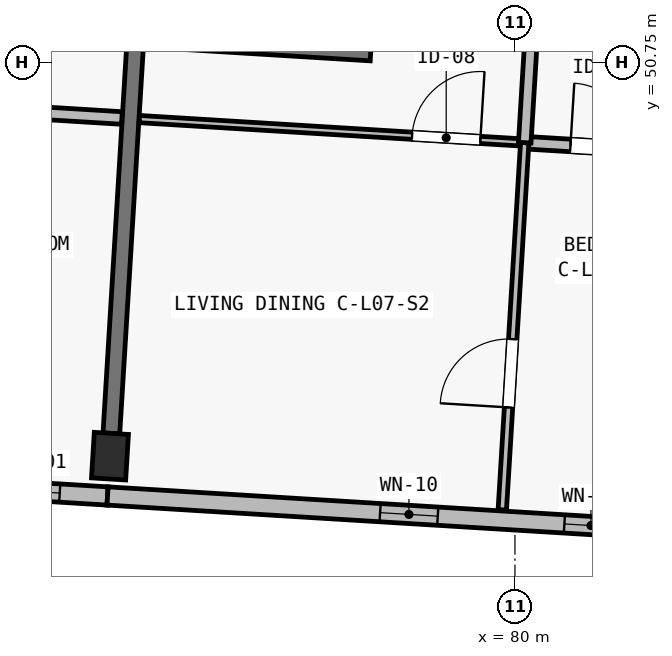
"""IFC4 building model, lengths in metres.
Left out: names, types, materials, properties, quantities, classifications, styles, units other than length and angle.
Written with IfcOpenShell. Run it as: python <this file> out.ifc"""

import sys

from ifc_helpers import new_model, si_unit, direction, frame, frame_2d, origin, origin_2d, place, context, subcontext, project, spatial, rectangle, extrude, element, fill, save


model = new_model("IFC4")
c1 = context("Model", 3, precision=1e-05, world=origin(), true_north=direction((0.0, 1.0)))
c2 = subcontext(c1, "Body", "Model", "MODEL_VIEW")
j1 = project(units=[si_unit("LENGTHUNIT", "METRE"), si_unit("PLANEANGLEUNIT", "RADIAN")], contexts=[c1])
p1 = place(None, origin())
s1 = spatial("IfcSite", under=j1, at=p1, CompositionType="ELEMENT")
p2 = place(p1, origin())
s2 = spatial("IfcBuilding", under=s1, at=p2, CompositionType="ELEMENT")
p3 = place(p2, frame((0.0, 0.0, 24.65)))
s3 = spatial("IfcBuildingStorey", under=s2, at=p3, CompositionType="ELEMENT", Elevation=24.65)
p4 = place(p3, frame((74.672, 45.572, 0.0), z_axis=(0.0, 0.0, 1.0), x_axis=(0.998134798422, -0.061048539535, 0.0)))
e1 = element("IfcColumn", 1, at=p4, inside=s3, PredefinedType="COLUMN", context=c2, shape_type="SweptSolid", body=[
    extrude(rectangle(XDim=0.45, YDim=0.6, at=origin_2d()), origin(), (0.0, 0.0, 1.0), 3.25),
])
p5 = place(p3, frame((74.69, 45.872, 0.0), z_axis=(0.0, 0.0, 1.0), x_axis=(0.061036313012, 0.998135546153, 0.0)))
e2 = element("IfcWall", 2, at=p5, inside=s3, PredefinedType="SHEAR", context=c2, shape_type="SweptSolid", body=[
    extrude(rectangle(XDim=7.0, YDim=0.22, at=frame_2d((3.5, 0.0))), origin(), (0.0, 0.0, 1.0), 2.5),
])
p6 = place(p3, frame((75.119, 51.08, 0.0), z_axis=(0.0, 0.0, 1.0), x_axis=(0.998133370443, -0.061071882298, 0.0)))
e3 = element("IfcWall", 3, at=p6, inside=s3, PredefinedType="SHEAR", context=c2, shape_type="SweptSolid", body=[
    extrude(rectangle(XDim=2.99, YDim=0.25, at=frame_2d((1.495, 0.0))), origin(), (0.0, 0.0, 1.0), 3.25),
])
p7 = place(p3, frame((74.64, 45.048, 0.0), z_axis=(0.0, 0.0, 1.0), x_axis=(-0.998135669243, 0.061034300063, 0.0)))
e4 = element("IfcWall", 4, at=p7, inside=s3, PredefinedType="SOLIDWALL", context=c2, shape_type="SweptSolid", body=[
    extrude(rectangle(XDim=7.6, YDim=0.24, at=frame_2d((3.8, 0.0))), origin(), (0.0, 0.0, 1.0), 3.0),
])
p8 = place(p7, frame((5.169, 0.0, 0.0)))
e5 = element("IfcOpeningElement", 5, at=p8, cuts=e4, PredefinedType="OPENING", context=c2, shape_type="SweptSolid", body=[
    extrude(rectangle(XDim=1.5, YDim=2.12, at=frame_2d((0.75, 1.06))), frame((0.0, 0.135, 0.0), z_axis=(0.0, -1.0, 0.0), x_axis=(1.0, 0.0, 0.0)), (0.0, 0.0, 1.0), 0.27),
])
p9 = place(p7, frame((0.63, 0.0, 0.5)))
e6 = element("IfcOpeningElement", 6, at=p9, cuts=e4, PredefinedType="OPENING", context=c2, shape_type="SweptSolid", body=[
    extrude(rectangle(XDim=0.58, YDim=2.16, at=frame_2d((0.29, 1.08))), frame((0.0, 0.135, 0.0), z_axis=(0.0, -1.0, 0.0), x_axis=(1.0, 0.0, 0.0)), (0.0, 0.0, 1.0), 0.27),
])
p10 = place(p3, frame((82.225, 44.584, 0.0), z_axis=(0.0, 0.0, 1.0), x_axis=(-0.998133591969, 0.061068261669, 0.0)))
e7 = element("IfcWall", 7, at=p10, inside=s3, PredefinedType="SOLIDWALL", context=c2, shape_type="SweptSolid", body=[
    extrude(rectangle(XDim=7.6, YDim=0.24, at=frame_2d((3.8, 0.0))), origin(), (0.0, 0.0, 1.0), 3.0),
])
p11 = place(p10, frame((0.878, 0.0, 0.42)))
e8 = element("IfcOpeningElement", 8, at=p11, cuts=e7, PredefinedType="OPENING", context=c2, shape_type="SweptSolid", body=[
    extrude(rectangle(XDim=0.7, YDim=2.36, at=frame_2d((0.35, 1.18))), frame((0.0, 0.135, 0.0), z_axis=(0.0, -1.0, 0.0), x_axis=(1.0, 0.0, 0.0)), (0.0, 0.0, 1.0), 0.27),
])
p12 = place(p10, frame((3.247, 0.0, 0.42)))
e9 = element("IfcOpeningElement", 9, at=p12, cuts=e7, PredefinedType="OPENING", context=c2, shape_type="SweptSolid", body=[
    extrude(rectangle(XDim=0.76, YDim=2.34, at=frame_2d((0.38, 1.17))), frame((0.0, 0.135, 0.0), z_axis=(0.0, -1.0, 0.0), x_axis=(1.0, 0.0, 0.0)), (0.0, 0.0, 1.0), 0.27),
])
p13 = place(p3, frame((71.15, 50.246, 0.0), z_axis=(0.0, 0.0, 1.0), x_axis=(0.998132682596, -0.061083123148, 0.0)))
e10 = element("IfcWall", 10, at=p13, inside=s3, PredefinedType="PLUMBINGWALL", context=c2, shape_type="SweptSolid", body=[
    extrude(rectangle(XDim=3.685, YDim=0.165, at=frame_2d((1.843, 0.0))), origin(), (0.0, 0.0, 1.0), 2.97),
])
p14 = place(p13, frame((1.3, 0.0, 0.0)))
e11 = element("IfcOpeningElement", 11, at=p14, cuts=e10, PredefinedType="OPENING", context=c2, shape_type="SweptSolid", body=[
    extrude(rectangle(XDim=0.82, YDim=2.08, at=frame_2d((0.41, 1.04))), frame((0.0, 0.097, 0.0), z_axis=(0.0, -1.0, 0.0), x_axis=(1.0, 0.0, 0.0)), (0.0, 0.0, 1.0), 0.195),
])
p15 = place(p3, frame((75.058, 50.007, 0.0), z_axis=(0.0, 0.0, 1.0), x_axis=(0.998132708268, -0.061082703655, 0.0)))
e12 = element("IfcWall", 12, at=p15, inside=s3, PredefinedType="PARTITIONING", context=c2, shape_type="SweptSolid", body=[
    extrude(rectangle(XDim=5.08, YDim=0.095, at=frame_2d((2.54, 0.0))), origin(), (0.0, 0.0, 1.0), 2.97),
])
p16 = place(p15, frame((3.595, 0.0, 0.0)))
e13 = element("IfcOpeningElement", 13, at=p16, cuts=e12, PredefinedType="OPENING", context=c2, shape_type="SweptSolid", body=[
    extrude(rectangle(XDim=0.9, YDim=2.1, at=frame_2d((0.45, 1.05))), frame((0.0, 0.062, 0.0), z_axis=(0.0, -1.0, 0.0), x_axis=(1.0, 0.0, 0.0)), (0.0, 0.0, 1.0), 0.125),
])
p17 = place(p3, frame((80.129, 49.697, 0.0), z_axis=(0.0, 0.0, 1.0), x_axis=(0.998138723231, -0.060984335579, 0.0)))
e14 = element("IfcWall", 14, at=p17, inside=s3, PredefinedType="PLUMBINGWALL", context=c2, shape_type="SweptSolid", body=[
    extrude(rectangle(XDim=2.29, YDim=0.165, at=frame_2d((1.145, 0.0))), origin(), (0.0, 0.0, 1.0), 2.97),
])
p18 = place(p17, frame((0.603, 0.0, 0.0)))
e15 = element("IfcOpeningElement", 15, at=p18, cuts=e14, PredefinedType="OPENING", context=c2, shape_type="SweptSolid", body=[
    extrude(rectangle(XDim=0.82, YDim=2.08, at=frame_2d((0.41, 1.04))), frame((0.0, 0.097, 0.0), z_axis=(0.0, -1.0, 0.0), x_axis=(1.0, 0.0, 0.0)), (0.0, 0.0, 1.0), 0.195),
])
p19 = place(p3, frame((79.833, 44.866, 0.0), z_axis=(0.0, 0.0, 1.0), x_axis=(0.061037243745, 0.998135489238, 0.0)))
e16 = element("IfcWall", 16, at=p19, inside=s3, PredefinedType="PARTITIONING", context=c2, shape_type="SweptSolid", body=[
    extrude(rectangle(XDim=4.84, YDim=0.11, at=frame_2d((2.42, 0.0))), origin(), (0.0, 0.0, 1.0), 2.97),
])
p20 = place(p19, frame((1.35, 0.0, 0.0)))
e17 = element("IfcOpeningElement", 17, at=p20, cuts=e16, PredefinedType="OPENING", context=c2, shape_type="SweptSolid", body=[
    extrude(rectangle(XDim=0.9, YDim=2.1, at=frame_2d((0.45, 1.05))), frame((0.0, 0.07, 0.0), z_axis=(0.0, -1.0, 0.0), x_axis=(1.0, 0.0, 0.0)), (0.0, 0.0, 1.0), 0.14),
])
p21 = place(p3, frame((80.129, 49.697, 0.0), z_axis=(0.0, 0.0, 1.0), x_axis=(0.061066961405, 0.998133671521, 0.0)))
e18 = element("IfcWall", 18, at=p21, inside=s3, PredefinedType="PLUMBINGWALL", context=c2, shape_type="SweptSolid", body=[
    extrude(rectangle(XDim=3.57, YDim=0.165, at=frame_2d((1.785, 0.0))), origin(), (0.0, 0.0, 1.0), 2.97),
])
p22 = place(p9, origin())
e19 = element("IfcWindow", 19, at=p22, inside=s3, PartitioningType="SINGLE_PANEL", PredefinedType="WINDOW", context=c2, shape_type="SweptSolid", body=[
    extrude(rectangle(XDim=0.58, YDim=2.16, at=frame_2d((0.29, 1.08))), frame((0.0, 0.03, 0.0), z_axis=(0.0, -1.0, 0.0), x_axis=(1.0, 0.0, 0.0)), (0.0, 0.0, 1.0), 0.06),
])
fill(e6, e19)
p23 = place(p11, origin())
e20 = element("IfcWindow", 20, at=p23, inside=s3, PartitioningType="SINGLE_PANEL", PredefinedType="WINDOW", context=c2, shape_type="SweptSolid", body=[
    extrude(rectangle(XDim=0.7, YDim=2.36, at=frame_2d((0.35, 1.18))), frame((0.0, 0.03, 0.0), z_axis=(0.0, -1.0, 0.0), x_axis=(1.0, 0.0, 0.0)), (0.0, 0.0, 1.0), 0.06),
])
fill(e8, e20)
p24 = place(p12, origin())
e21 = element("IfcWindow", 21, at=p24, inside=s3, PartitioningType="SINGLE_PANEL", PredefinedType="WINDOW", context=c2, shape_type="SweptSolid", body=[
    extrude(rectangle(XDim=0.76, YDim=2.34, at=frame_2d((0.38, 1.17))), frame((0.0, 0.03, 0.0), z_axis=(0.0, -1.0, 0.0), x_axis=(1.0, 0.0, 0.0)), (0.0, 0.0, 1.0), 0.06),
])
fill(e9, e21)
p25 = place(p16, origin())
e22 = element("IfcDoor", 22, at=p25, inside=s3, OperationType="SINGLE_SWING_RIGHT", PredefinedType="DOOR", context=c2, shape_type="SweptSolid", body=[
    extrude(rectangle(XDim=0.9, YDim=2.1, at=frame_2d((0.45, 1.05))), frame((0.0, 0.025, 0.0), z_axis=(0.0, -1.0, 0.0), x_axis=(1.0, 0.0, 0.0)), (0.0, 0.0, 1.0), 0.05),
])
fill(e13, e22)
p26 = place(p18, origin())
e23 = element("IfcDoor", 23, at=p26, inside=s3, OperationType="SINGLE_SWING_LEFT", PredefinedType="DOOR", context=c2, shape_type="SweptSolid", body=[
    extrude(rectangle(XDim=0.82, YDim=2.08, at=frame_2d((0.41, 1.04))), frame((0.0, 0.025, 0.0), z_axis=(0.0, -1.0, 0.0), x_axis=(1.0, 0.0, 0.0)), (0.0, 0.0, 1.0), 0.05),
])
fill(e15, e23)
p27 = place(p20, origin())
e24 = element("IfcDoor", 24, at=p27, inside=s3, OperationType="SINGLE_SWING_LEFT", PredefinedType="DOOR", context=c2, shape_type="SweptSolid", body=[
    extrude(rectangle(XDim=0.9, YDim=2.1, at=frame_2d((0.45, 1.05))), frame((0.0, 0.025, 0.0), z_axis=(0.0, -1.0, 0.0), x_axis=(1.0, 0.0, 0.0)), (0.0, 0.0, 1.0), 0.05),
])
fill(e17, e24)
save(model, sys.argv[1])
